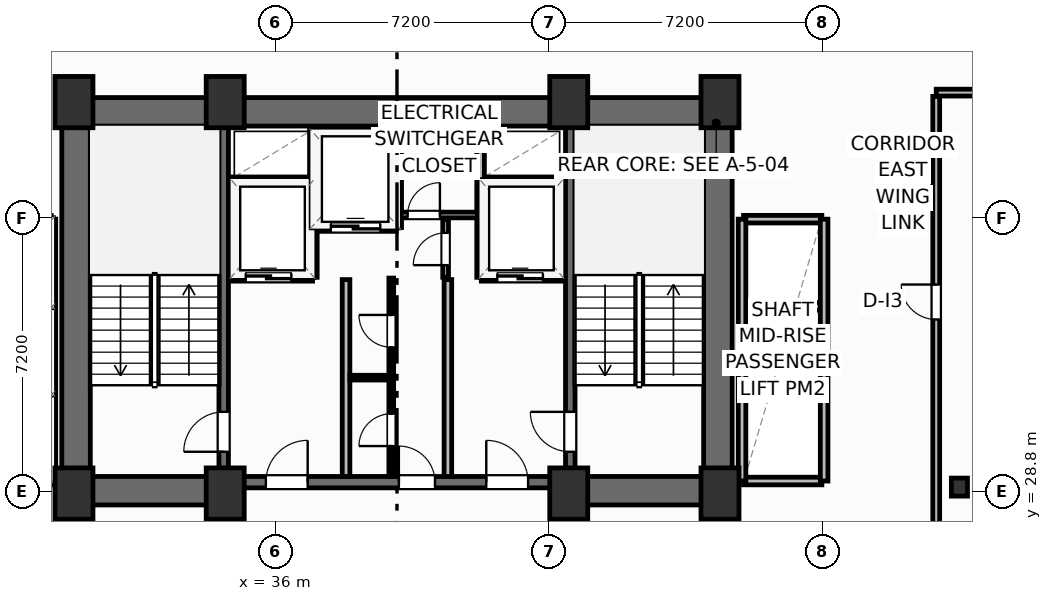
"""IFC4 building model, lengths in metres.
Left out: names, types, materials, properties, quantities, classifications, styles, units other than length and angle.
Written with IfcOpenShell. Run it as: python <this file> out.ifc"""

import sys

from ifc_helpers import new_model, si_unit, direction, frame, frame_2d, origin, origin_2d, place, context, subcontext, project, spatial, rectangle, i_section, extrude, element, fill, save


model = new_model("IFC4")
c1 = context("Model", 3, precision=1e-05, world=origin(), true_north=direction((0.0, 1.0)))
c2 = subcontext(c1, "Body", "Model", "MODEL_VIEW")
j1 = project(units=[si_unit("LENGTHUNIT", "METRE"), si_unit("PLANEANGLEUNIT", "RADIAN")], contexts=[c1])
p1 = place(None, origin())
s1 = spatial("IfcSite", under=j1, at=p1, CompositionType="ELEMENT")
p2 = place(p1, origin())
s2 = spatial("IfcBuilding", under=s1, at=p2, CompositionType="ELEMENT")
p3 = place(p2, frame((0.0, 0.0, 94.7)))
s3 = spatial("IfcBuildingStorey", under=s2, at=p3, CompositionType="ELEMENT", Elevation=94.7)
for number, where, z_axis, x_axis in (
    (1, (30.7, 28.75, 0.0), (0.0, 0.0, 1.0), (1.0, 0.0, 0.0)),
    (2, (34.68, 28.75, 0.0), (0.0, 0.0, 1.0), (1.0, 0.0, 0.0)),
    (3, (43.72, 28.75, 0.0), (0.0, 0.0, 1.0), (1.0, 0.0, 0.0)),
    (4, (47.7, 28.75, 0.0), (0.0, 0.0, 1.0), (1.0, 0.0, 0.0)),
    (5, (30.7, 39.05, 0.0), (0.0, 0.0, 1.0), (1.0, 0.0, 0.0)),
    (6, (34.68, 39.05, 0.0), (0.0, 0.0, 1.0), (1.0, 0.0, 0.0)),
    (7, (43.72, 39.05, 0.0), (0.0, 0.0, 1.0), (1.0, 0.0, 0.0)),
    (8, (47.7, 39.05, 0.0), (0.0, 0.0, 1.0), (1.0, 0.0, 0.0)),
):
    element("IfcColumn", number, at=place(p3, frame(where, z_axis=z_axis, x_axis=x_axis)), inside=s3, PredefinedType="COLUMN", context=c2, shape_type="SweptSolid", body=[
        extrude(rectangle(XDim=1.0, YDim=1.35, at=origin_2d()), origin(), (0.0, 0.0, 1.0), 3.7),
    ])
p4 = place(p3, frame((54.0, 28.92, 0.0), z_axis=(0.0, 0.0, 1.0), x_axis=(1.0, 0.0, 0.0)))
e9 = element("IfcColumn", 9, at=p4, inside=s3, PredefinedType="COLUMN", context=c2, shape_type="SweptSolid", body=[
    extrude(i_section(OverallWidth=0.424, OverallDepth=0.474, WebThickness=0.048, FlangeThickness=0.077, FilletRadius=0.025, at=origin_2d()), origin(), (0.0, 0.0, 1.0), 3.7),
])
p5 = place(p3, frame((30.38, 38.795, 0.0), z_axis=(0.0, 0.0, 1.0), x_axis=(1.0, 0.0, 0.0)))
e10 = element("IfcWall", 10, at=p5, inside=s3, PredefinedType="SHEAR", context=c2, shape_type="SweptSolid", body=[
    extrude(rectangle(XDim=17.64, YDim=0.75, at=frame_2d((8.82, 0.0))), origin(), (0.0, 0.0, 1.0), 3.45),
])
for number, where, z_axis, x_axis in (
    (11, (30.755, 29.2, 0.0), (0.0, 0.0, 1.0), (0.0, 1.0, 0.0)),
    (12, (47.645, 29.2, 0.0), (0.0, 0.0, 1.0), (0.0, 1.0, 0.0)),
):
    element("IfcWall", number, at=place(p3, frame(where, z_axis=z_axis, x_axis=x_axis)), inside=s3, PredefinedType="SHEAR", context=c2, shape_type="SweptSolid", body=[
        extrude(rectangle(XDim=9.22, YDim=0.75, at=frame_2d((4.61, 0.0))), origin(), (0.0, 0.0, 1.0), 3.45),
    ])
p6 = place(p3, frame((30.38, 28.825, 0.0), z_axis=(0.0, 0.0, 1.0), x_axis=(1.0, 0.0, 0.0)))
e13 = element("IfcWall", 13, at=p6, inside=s3, PredefinedType="SHEAR", context=c2, shape_type="SweptSolid", body=[
    extrude(rectangle(XDim=4.42, YDim=0.75, at=frame_2d((2.21, 0.0))), origin(), (0.0, 0.0, 1.0), 3.45),
])
p7 = place(p3, frame((43.6, 28.825, 0.0), z_axis=(0.0, 0.0, 1.0), x_axis=(1.0, 0.0, 0.0)))
e14 = element("IfcWall", 14, at=p7, inside=s3, PredefinedType="SHEAR", context=c2, shape_type="SweptSolid", body=[
    extrude(rectangle(XDim=4.42, YDim=0.75, at=frame_2d((2.21, 0.0))), origin(), (0.0, 0.0, 1.0), 3.45),
])
p8 = place(p3, frame((34.8, 29.05, 0.0), z_axis=(0.0, 0.0, 1.0), x_axis=(1.0, 0.0, 0.0)))
e15 = element("IfcWall", 15, at=p8, inside=s3, PredefinedType="SHEAR", context=c2, shape_type="SweptSolid", body=[
    extrude(rectangle(XDim=8.8, YDim=0.3, at=frame_2d((4.4, 0.0))), origin(), (0.0, 0.0, 1.0), 3.45),
])
p9 = place(p8, frame((0.95, 0.0, 0.0)))
e16 = element("IfcOpeningElement", 16, at=p9, cuts=e15, PredefinedType="OPENING", context=c2, shape_type="SweptSolid", body=[
    extrude(rectangle(XDim=1.1, YDim=2.15, at=frame_2d((0.55, 1.075))), frame((0.0, 0.16, 0.0), z_axis=(0.0, -1.0, 0.0), x_axis=(1.0, 0.0, 0.0)), (0.0, 0.0, 1.0), 0.32),
])
p10 = place(p8, frame((6.75, 0.0, 0.0)))
e17 = element("IfcOpeningElement", 17, at=p10, cuts=e15, PredefinedType="OPENING", context=c2, shape_type="SweptSolid", body=[
    extrude(rectangle(XDim=1.1, YDim=2.15, at=frame_2d((0.55, 1.075))), frame((0.0, 0.16, 0.0), z_axis=(0.0, -1.0, 0.0), x_axis=(1.0, 0.0, 0.0)), (0.0, 0.0, 1.0), 0.32),
])
p11 = place(p8, frame((4.45, 0.0, 0.0)))
e18 = element("IfcOpeningElement", 18, at=p11, cuts=e15, PredefinedType="OPENING", context=c2, shape_type="SweptSolid", body=[
    extrude(rectangle(XDim=0.95, YDim=2.15, at=frame_2d((0.475, 1.075))), frame((0.0, 0.16, 0.0), z_axis=(0.0, -1.0, 0.0), x_axis=(1.0, 0.0, 0.0)), (0.0, 0.0, 1.0), 0.32),
])
p12 = place(p3, frame((34.64, 29.2, 0.0), z_axis=(0.0, 0.0, 1.0), x_axis=(0.0, 1.0, 0.0)))
e19 = element("IfcWall", 19, at=p12, inside=s3, PredefinedType="SHEAR", context=c2, shape_type="SweptSolid", body=[
    extrude(rectangle(XDim=9.22, YDim=0.25, at=frame_2d((4.61, 0.0))), origin(), (0.0, 0.0, 1.0), 3.45),
])
p13 = place(p12, frame((0.65, 0.0, 0.0)))
e20 = element("IfcOpeningElement", 20, at=p13, cuts=e19, PredefinedType="OPENING", context=c2, shape_type="SweptSolid", body=[
    extrude(rectangle(XDim=1.05, YDim=2.15, at=frame_2d((0.525, 1.075))), frame((0.0, 0.135, 0.0), z_axis=(0.0, -1.0, 0.0), x_axis=(1.0, 0.0, 0.0)), (0.0, 0.0, 1.0), 0.27),
])
p14 = place(p3, frame((43.76, 29.2, 0.0), z_axis=(0.0, 0.0, 1.0), x_axis=(0.0, 1.0, 0.0)))
e21 = element("IfcWall", 21, at=p14, inside=s3, PredefinedType="SHEAR", context=c2, shape_type="SweptSolid", body=[
    extrude(rectangle(XDim=9.22, YDim=0.25, at=frame_2d((4.61, 0.0))), origin(), (0.0, 0.0, 1.0), 3.45),
])
p15 = place(p14, frame((0.65, 0.0, 0.0)))
e22 = element("IfcOpeningElement", 22, at=p15, cuts=e21, PredefinedType="OPENING", context=c2, shape_type="SweptSolid", body=[
    extrude(rectangle(XDim=1.05, YDim=2.15, at=frame_2d((0.525, 1.075))), frame((0.0, 0.135, 0.0), z_axis=(0.0, -1.0, 0.0), x_axis=(1.0, 0.0, 0.0)), (0.0, 0.0, 1.0), 0.27),
])
p16 = place(p3, frame((53.39, 27.53, 0.0), z_axis=(0.0, 0.0, 1.0), x_axis=(0.0, 1.0, 0.0)))
e23 = element("IfcWall", 23, at=p16, inside=s3, PredefinedType="PARTITIONING", context=c2, shape_type="SweptSolid", body=[
    extrude(rectangle(XDim=11.67, YDim=0.18, at=frame_2d((5.835, 0.0))), origin(), (0.0, 0.0, 1.0), 3.45),
])
p17 = place(p16, frame((5.8, 0.0, 0.0)))
e24 = element("IfcOpeningElement", 24, at=p17, cuts=e23, PredefinedType="OPENING", context=c2, shape_type="SweptSolid", body=[
    extrude(rectangle(XDim=0.92, YDim=2.05, at=frame_2d((0.46, 1.025))), frame((0.0, 0.1, 0.0), z_axis=(0.0, -1.0, 0.0), x_axis=(1.0, 0.0, 0.0)), (0.0, 0.0, 1.0), 0.2),
])
p18 = place(p3, frame((53.39, 39.3, 0.0), z_axis=(0.0, 0.0, 1.0), x_axis=(1.0, 0.0, 0.0)))
e25 = element("IfcWall", 25, at=p18, inside=s3, PredefinedType="PARTITIONING", context=c2, shape_type="SweptSolid", body=[
    extrude(rectangle(XDim=8.876, YDim=0.18, at=frame_2d((4.438, 0.0))), origin(), (0.0, 0.0, 1.0), 3.45),
])
for number, where, z_axis, x_axis in (
    (26, (37.86, 29.2, 0.0), (0.0, 0.0, 1.0), (0.0, 1.0, 0.0)),
    (27, (40.54, 29.2, 0.0), (0.0, 0.0, 1.0), (0.0, 1.0, 0.0)),
):
    element("IfcWall", number, at=place(p3, frame(where, z_axis=z_axis, x_axis=x_axis)), inside=s3, PredefinedType="PARTITIONING", context=c2, shape_type="SweptSolid", body=[
        extrude(rectangle(XDim=5.18, YDim=0.2, at=frame_2d((2.59, 0.0))), origin(), (0.0, 0.0, 1.0), 3.45),
    ])
p19 = place(p3, frame((34.8, 34.44, 0.0), z_axis=(0.0, 0.0, 1.0), x_axis=(1.0, 0.0, 0.0)))
e28 = element("IfcWall", 28, at=p19, inside=s3, PredefinedType="PARTITIONING", context=c2, shape_type="SweptSolid", body=[
    extrude(rectangle(XDim=2.18, YDim=0.2, at=frame_2d((1.09, 0.0))), origin(), (0.0, 0.0, 1.0), 3.45),
])
p20 = place(p19, frame((0.42, 0.0, 0.0)))
e29 = element("IfcOpeningElement", 29, at=p20, cuts=e28, PredefinedType="OPENING", context=c2, shape_type="SweptSolid", body=[
    extrude(rectangle(XDim=1.2, YDim=2.2, at=frame_2d((0.6, 1.1))), frame((0.0, 0.11, 0.0), z_axis=(0.0, -1.0, 0.0), x_axis=(1.0, 0.0, 0.0)), (0.0, 0.0, 1.0), 0.22),
])
p21 = place(p3, frame((34.8, 36.98, 0.0), z_axis=(0.0, 0.0, 1.0), x_axis=(1.0, 0.0, 0.0)))
e30 = element("IfcWall", 30, at=p21, inside=s3, PredefinedType="PARTITIONING", context=c2, shape_type="SweptSolid", body=[
    extrude(rectangle(XDim=2.18, YDim=0.2, at=frame_2d((1.09, 0.0))), origin(), (0.0, 0.0, 1.0), 3.45),
])
p22 = place(p3, frame((37.0, 34.44, 0.0), z_axis=(0.0, 0.0, 1.0), x_axis=(0.0, 1.0, 0.0)))
e31 = element("IfcWall", 31, at=p22, inside=s3, PredefinedType="PARTITIONING", context=c2, shape_type="SweptSolid", body=[
    extrude(rectangle(XDim=3.9, YDim=0.2, at=frame_2d((1.95, 0.0))), origin(), (0.0, 0.0, 1.0), 3.45),
])
p23 = place(p3, frame((41.42, 34.44, 0.0), z_axis=(0.0, 0.0, 1.0), x_axis=(1.0, 0.0, 0.0)))
e32 = element("IfcWall", 32, at=p23, inside=s3, PredefinedType="PARTITIONING", context=c2, shape_type="SweptSolid", body=[
    extrude(rectangle(XDim=2.18, YDim=0.2, at=frame_2d((1.09, 0.0))), origin(), (0.0, 0.0, 1.0), 3.45),
])
p24 = place(p23, frame((0.42, 0.0, 0.0)))
e33 = element("IfcOpeningElement", 33, at=p24, cuts=e32, PredefinedType="OPENING", context=c2, shape_type="SweptSolid", body=[
    extrude(rectangle(XDim=1.2, YDim=2.2, at=frame_2d((0.6, 1.1))), frame((0.0, 0.11, 0.0), z_axis=(0.0, -1.0, 0.0), x_axis=(1.0, 0.0, 0.0)), (0.0, 0.0, 1.0), 0.22),
])
p25 = place(p3, frame((41.42, 36.98, 0.0), z_axis=(0.0, 0.0, 1.0), x_axis=(1.0, 0.0, 0.0)))
e34 = element("IfcWall", 34, at=p25, inside=s3, PredefinedType="PARTITIONING", context=c2, shape_type="SweptSolid", body=[
    extrude(rectangle(XDim=2.18, YDim=0.2, at=frame_2d((1.09, 0.0))), origin(), (0.0, 0.0, 1.0), 3.45),
])
p26 = place(p3, frame((41.4, 34.44, 0.0), z_axis=(0.0, 0.0, 1.0), x_axis=(0.0, 1.0, 0.0)))
e35 = element("IfcWall", 35, at=p26, inside=s3, PredefinedType="PARTITIONING", context=c2, shape_type="SweptSolid", body=[
    extrude(rectangle(XDim=3.9, YDim=0.2, at=frame_2d((1.95, 0.0))), origin(), (0.0, 0.0, 1.0), 3.45),
])
p27 = place(p3, frame((37.06, 35.75, 0.0), z_axis=(0.0, 0.0, 1.0), x_axis=(1.0, 0.0, 0.0)))
e36 = element("IfcWall", 36, at=p27, inside=s3, PredefinedType="PARTITIONING", context=c2, shape_type="SweptSolid", body=[
    extrude(rectangle(XDim=2.12, YDim=0.2, at=frame_2d((1.06, 0.0))), origin(), (0.0, 0.0, 1.0), 3.45),
])
p28 = place(p27, frame((0.4, 0.0, 0.0)))
e37 = element("IfcOpeningElement", 37, at=p28, cuts=e36, PredefinedType="OPENING", context=c2, shape_type="SweptSolid", body=[
    extrude(rectangle(XDim=1.3, YDim=2.2, at=frame_2d((0.65, 1.1))), frame((0.0, 0.11, 0.0), z_axis=(0.0, -1.0, 0.0), x_axis=(1.0, 0.0, 0.0)), (0.0, 0.0, 1.0), 0.22),
])
p29 = place(p3, frame((39.22, 35.75, 0.0), z_axis=(0.0, 0.0, 1.0), x_axis=(0.0, 1.0, 0.0)))
e38 = element("IfcWall", 38, at=p29, inside=s3, PredefinedType="PARTITIONING", context=c2, shape_type="SweptSolid", body=[
    extrude(rectangle(XDim=2.59, YDim=0.2, at=frame_2d((1.295, 0.0))), origin(), (0.0, 0.0, 1.0), 3.45),
])
p30 = place(p3, frame((39.3, 36.08, 0.0), z_axis=(0.0, 0.0, 1.0), x_axis=(1.0, 0.0, 0.0)))
e39 = element("IfcWall", 39, at=p30, inside=s3, PredefinedType="PARTITIONING", context=c2, shape_type="SweptSolid", body=[
    extrude(rectangle(XDim=2.02, YDim=0.15, at=frame_2d((1.01, 0.0))), origin(), (0.0, 0.0, 1.0), 3.45),
])
p31 = place(p30, frame((0.18, 0.0, 0.0)))
e40 = element("IfcOpeningElement", 40, at=p31, cuts=e39, PredefinedType="OPENING", context=c2, shape_type="SweptSolid", body=[
    extrude(rectangle(XDim=0.85, YDim=2.05, at=frame_2d((0.425, 1.025))), frame((0.0, 0.085, 0.0), z_axis=(0.0, -1.0, 0.0), x_axis=(1.0, 0.0, 0.0)), (0.0, 0.0, 1.0), 0.17),
])
p32 = place(p3, frame((40.48, 34.44, 0.0), z_axis=(0.0, 0.0, 1.0), x_axis=(0.0, 1.0, 0.0)))
e41 = element("IfcWall", 41, at=p32, inside=s3, PredefinedType="PARTITIONING", context=c2, shape_type="SweptSolid", body=[
    extrude(rectangle(XDim=1.52, YDim=0.15, at=frame_2d((0.76, 0.0))), origin(), (0.0, 0.0, 1.0), 3.45),
])
p33 = place(p32, frame((0.32, 0.0, 0.0)))
e42 = element("IfcOpeningElement", 42, at=p33, cuts=e41, PredefinedType="OPENING", context=c2, shape_type="SweptSolid", body=[
    extrude(rectangle(XDim=0.85, YDim=2.05, at=frame_2d((0.425, 1.025))), frame((0.0, 0.085, 0.0), z_axis=(0.0, -1.0, 0.0), x_axis=(1.0, 0.0, 0.0)), (0.0, 0.0, 1.0), 0.17),
])
p34 = place(p3, frame((37.96, 31.8, 0.0), z_axis=(0.0, 0.0, 1.0), x_axis=(1.0, 0.0, 0.0)))
e43 = element("IfcWall", 43, at=p34, inside=s3, PredefinedType="PARTITIONING", context=c2, shape_type="SweptSolid", body=[
    extrude(rectangle(XDim=1.09, YDim=0.125, at=frame_2d((0.545, 0.0))), origin(), (0.0, 0.0, 1.0), 3.45),
])
p35 = place(p3, frame((39.05, 29.2, 0.0), z_axis=(0.0, 0.0, 1.0), x_axis=(0.0, 1.0, 0.0)))
e44 = element("IfcWall", 44, at=p35, inside=s3, PredefinedType="PARTITIONING", context=c2, shape_type="SweptSolid", body=[
    extrude(rectangle(XDim=5.22, YDim=0.125, at=frame_2d((2.61, 0.0))), origin(), (0.0, 0.0, 1.0), 3.45),
])
p36 = place(p35, frame((0.8, 0.0, 0.0)))
e45 = element("IfcOpeningElement", 45, at=p36, cuts=e44, PredefinedType="OPENING", context=c2, shape_type="SweptSolid", body=[
    extrude(rectangle(XDim=0.85, YDim=2.05, at=frame_2d((0.425, 1.025))), frame((0.0, 0.073, 0.0), z_axis=(0.0, -1.0, 0.0), x_axis=(1.0, 0.0, 0.0)), (0.0, 0.0, 1.0), 0.145),
])
p37 = place(p35, frame((3.4, 0.0, 0.0)))
e46 = element("IfcOpeningElement", 46, at=p37, cuts=e44, PredefinedType="OPENING", context=c2, shape_type="SweptSolid", body=[
    extrude(rectangle(XDim=0.85, YDim=2.05, at=frame_2d((0.425, 1.025))), frame((0.0, 0.073, 0.0), z_axis=(0.0, -1.0, 0.0), x_axis=(1.0, 0.0, 0.0)), (0.0, 0.0, 1.0), 0.145),
])
p38 = place(p3, frame((30.12, 29.08, 0.0), z_axis=(0.0, 0.0, 1.0), x_axis=(0.0, 1.0, 0.0)))
e47 = element("IfcWall", 47, at=p38, inside=s3, PredefinedType="PARTITIONING", context=c2, shape_type="SweptSolid", body=[
    extrude(rectangle(XDim=6.89, YDim=0.2, at=frame_2d((3.445, 0.0))), origin(), (0.0, 0.0, 1.0), 3.45),
])
for number, where, z_axis, x_axis in (
    (48, (48.32, 31.375, 0.0), (0.0, 0.0, 1.0), (1.0, 0.0, 0.0)),
    (49, (48.32, 33.675, 0.0), (0.0, 0.0, 1.0), (1.0, 0.0, 0.0)),
):
    element("IfcWall", number, at=place(p3, frame(where, z_axis=z_axis, x_axis=x_axis)), inside=s3, PredefinedType="PARTITIONING", context=c2, shape_type="SweptSolid", body=[
        extrude(rectangle(XDim=2.06, YDim=0.2, at=frame_2d((1.03, 0.0))), origin(), (0.0, 0.0, 1.0), 3.45),
    ])
p39 = place(p3, frame((48.32, 29.08, 0.0), z_axis=(0.0, 0.0, 1.0), x_axis=(1.0, 0.0, 0.0)))
e50 = element("IfcWall", 50, at=p39, inside=s3, PredefinedType="PARTITIONING", context=c2, shape_type="SweptSolid", body=[
    extrude(rectangle(XDim=2.06, YDim=0.2, at=frame_2d((1.03, 0.0))), origin(), (0.0, 0.0, 1.0), 2.662),
])
p40 = place(p3, frame((48.32, 35.97, 0.0), z_axis=(0.0, 0.0, 1.0), x_axis=(1.0, 0.0, 0.0)))
e51 = element("IfcWall", 51, at=p40, inside=s3, PredefinedType="PARTITIONING", context=c2, shape_type="SweptSolid", body=[
    extrude(rectangle(XDim=2.06, YDim=0.2, at=frame_2d((1.03, 0.0))), origin(), (0.0, 0.0, 1.0), 3.45),
])
for number, where, z_axis, x_axis in (
    (52, (48.28, 29.08, 0.0), (0.0, 0.0, 1.0), (0.0, 1.0, 0.0)),
    (53, (50.44, 29.08, 0.0), (0.0, 0.0, 1.0), (0.0, 1.0, 0.0)),
):
    element("IfcWall", number, at=place(p3, frame(where, z_axis=z_axis, x_axis=x_axis)), inside=s3, PredefinedType="PARTITIONING", context=c2, shape_type="SweptSolid", body=[
        extrude(rectangle(XDim=6.89, YDim=0.2, at=frame_2d((3.445, 0.0))), origin(), (0.0, 0.0, 1.0), 3.45),
    ])
p41 = place(p17, origin())
e54 = element("IfcDoor", 54, at=p41, inside=s3, OperationType="SINGLE_SWING_RIGHT", PredefinedType="DOOR", context=c2, shape_type="SweptSolid", body=[
    extrude(rectangle(XDim=0.92, YDim=2.05, at=frame_2d((0.46, 1.025))), frame((0.0, 0.025, 0.0), z_axis=(0.0, -1.0, 0.0), x_axis=(1.0, 0.0, 0.0)), (0.0, 0.0, 1.0), 0.05),
])
fill(e24, e54)
p42 = place(p13, origin())
e55 = element("IfcDoor", 55, at=p42, inside=s3, OperationType="SINGLE_SWING_LEFT", PredefinedType="DOOR", context=c2, shape_type="SweptSolid", body=[
    extrude(rectangle(XDim=1.05, YDim=2.15, at=frame_2d((0.525, 1.075))), frame((0.0, 0.025, 0.0), z_axis=(0.0, -1.0, 0.0), x_axis=(1.0, 0.0, 0.0)), (0.0, 0.0, 1.0), 0.05),
])
fill(e20, e55)
p43 = place(p15, origin())
e56 = element("IfcDoor", 56, at=p43, inside=s3, OperationType="SINGLE_SWING_RIGHT", PredefinedType="DOOR", context=c2, shape_type="SweptSolid", body=[
    extrude(rectangle(XDim=1.05, YDim=2.15, at=frame_2d((0.525, 1.075))), frame((0.0, 0.025, 0.0), z_axis=(0.0, -1.0, 0.0), x_axis=(1.0, 0.0, 0.0)), (0.0, 0.0, 1.0), 0.05),
])
fill(e22, e56)
p44 = place(p9, origin())
e57 = element("IfcDoor", 57, at=p44, inside=s3, OperationType="SINGLE_SWING_RIGHT", PredefinedType="DOOR", context=c2, shape_type="SweptSolid", body=[
    extrude(rectangle(XDim=1.1, YDim=2.15, at=frame_2d((0.55, 1.075))), frame((0.0, 0.025, 0.0), z_axis=(0.0, -1.0, 0.0), x_axis=(1.0, 0.0, 0.0)), (0.0, 0.0, 1.0), 0.05),
])
fill(e16, e57)
p45 = place(p10, origin())
e58 = element("IfcDoor", 58, at=p45, inside=s3, OperationType="SINGLE_SWING_LEFT", PredefinedType="DOOR", context=c2, shape_type="SweptSolid", body=[
    extrude(rectangle(XDim=1.1, YDim=2.15, at=frame_2d((0.55, 1.075))), frame((0.0, 0.025, 0.0), z_axis=(0.0, -1.0, 0.0), x_axis=(1.0, 0.0, 0.0)), (0.0, 0.0, 1.0), 0.05),
])
fill(e17, e58)
p46 = place(p20, origin())
e59 = element("IfcDoor", 59, at=p46, inside=s3, OperationType="SLIDING_TO_LEFT", PredefinedType="DOOR", context=c2, shape_type="SweptSolid", body=[
    extrude(rectangle(XDim=1.2, YDim=2.2, at=frame_2d((0.6, 1.1))), frame((0.0, 0.025, 0.0), z_axis=(0.0, -1.0, 0.0), x_axis=(1.0, 0.0, 0.0)), (0.0, 0.0, 1.0), 0.05),
])
fill(e29, e59)
p47 = place(p24, origin())
e60 = element("IfcDoor", 60, at=p47, inside=s3, OperationType="SLIDING_TO_LEFT", PredefinedType="DOOR", context=c2, shape_type="SweptSolid", body=[
    extrude(rectangle(XDim=1.2, YDim=2.2, at=frame_2d((0.6, 1.1))), frame((0.0, 0.025, 0.0), z_axis=(0.0, -1.0, 0.0), x_axis=(1.0, 0.0, 0.0)), (0.0, 0.0, 1.0), 0.05),
])
fill(e33, e60)
p48 = place(p28, origin())
e61 = element("IfcDoor", 61, at=p48, inside=s3, OperationType="SLIDING_TO_LEFT", PredefinedType="DOOR", context=c2, shape_type="SweptSolid", body=[
    extrude(rectangle(XDim=1.3, YDim=2.2, at=frame_2d((0.65, 1.1))), frame((0.0, 0.025, 0.0), z_axis=(0.0, -1.0, 0.0), x_axis=(1.0, 0.0, 0.0)), (0.0, 0.0, 1.0), 0.05),
])
fill(e37, e61)
p49 = place(p31, origin())
e62 = element("IfcDoor", 62, at=p49, inside=s3, OperationType="SINGLE_SWING_RIGHT", PredefinedType="DOOR", context=c2, shape_type="SweptSolid", body=[
    extrude(rectangle(XDim=0.85, YDim=2.05, at=frame_2d((0.425, 1.025))), frame((0.0, 0.025, 0.0), z_axis=(0.0, -1.0, 0.0), x_axis=(1.0, 0.0, 0.0)), (0.0, 0.0, 1.0), 0.05),
])
fill(e40, e62)
p50 = place(p33, origin())
e63 = element("IfcDoor", 63, at=p50, inside=s3, OperationType="SINGLE_SWING_LEFT", PredefinedType="DOOR", context=c2, shape_type="SweptSolid", body=[
    extrude(rectangle(XDim=0.85, YDim=2.05, at=frame_2d((0.425, 1.025))), frame((0.0, 0.025, 0.0), z_axis=(0.0, -1.0, 0.0), x_axis=(1.0, 0.0, 0.0)), (0.0, 0.0, 1.0), 0.05),
])
fill(e42, e63)
p51 = place(p36, origin())
e64 = element("IfcDoor", 64, at=p51, inside=s3, OperationType="SINGLE_SWING_LEFT", PredefinedType="DOOR", context=c2, shape_type="SweptSolid", body=[
    extrude(rectangle(XDim=0.85, YDim=2.05, at=frame_2d((0.425, 1.025))), frame((0.0, 0.025, 0.0), z_axis=(0.0, -1.0, 0.0), x_axis=(1.0, 0.0, 0.0)), (0.0, 0.0, 1.0), 0.05),
])
fill(e45, e64)
p52 = place(p37, origin())
e65 = element("IfcDoor", 65, at=p52, inside=s3, OperationType="SINGLE_SWING_RIGHT", PredefinedType="DOOR", context=c2, shape_type="SweptSolid", body=[
    extrude(rectangle(XDim=0.85, YDim=2.05, at=frame_2d((0.425, 1.025))), frame((0.0, 0.025, 0.0), z_axis=(0.0, -1.0, 0.0), x_axis=(1.0, 0.0, 0.0)), (0.0, 0.0, 1.0), 0.05),
])
fill(e46, e65)
p53 = place(p11, origin())
e66 = element("IfcDoor", 66, at=p53, inside=s3, OperationType="SINGLE_SWING_LEFT", PredefinedType="DOOR", context=c2, shape_type="SweptSolid", body=[
    extrude(rectangle(XDim=0.95, YDim=2.15, at=frame_2d((0.475, 1.075))), frame((0.0, 0.025, 0.0), z_axis=(0.0, -1.0, 0.0), x_axis=(1.0, 0.0, 0.0)), (0.0, 0.0, 1.0), 0.05),
])
fill(e18, e66)
save(model, sys.argv[1])
